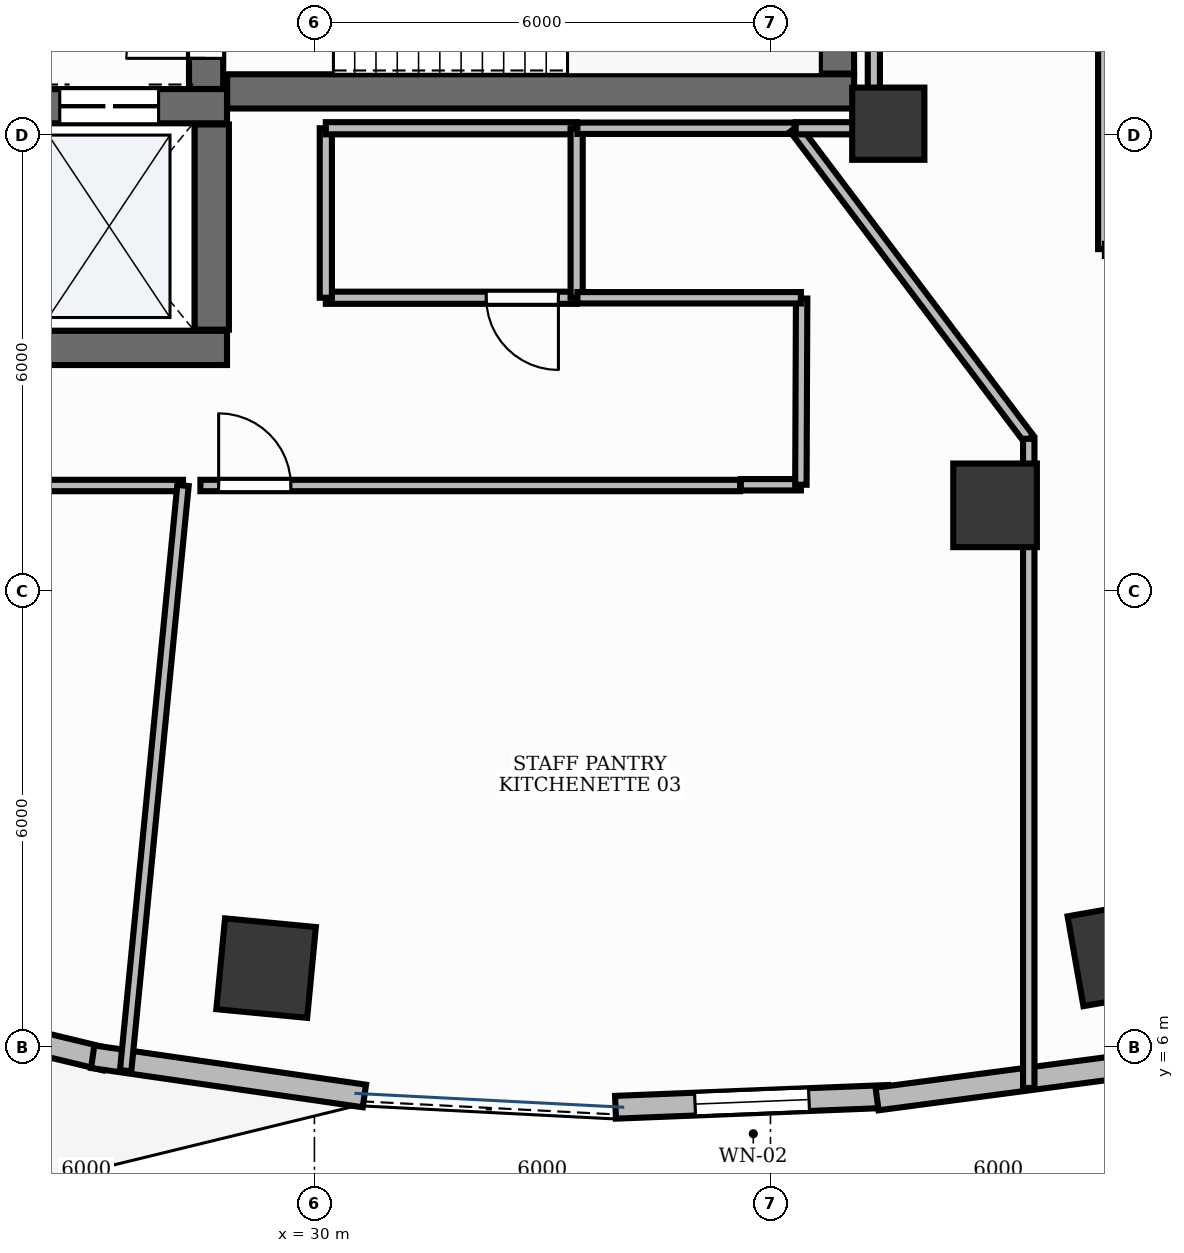
"""IFC4 building model, lengths in metres.
Left out: names, types, materials, properties, quantities, classifications, styles, units other than length and angle.
Written with IfcOpenShell. Run it as: python <this file> out.ifc"""

import sys

from ifc_helpers import new_model, si_unit, direction, frame, frame_2d, origin, origin_2d, place, context, subcontext, project, spatial, rectangle, extrude, element, fill, save


model = new_model("IFC4")
c1 = context("Model", 3, precision=1e-05, world=origin(), true_north=direction((0.0, 1.0)))
c2 = subcontext(c1, "Body", "Model", "MODEL_VIEW")
j1 = project(units=[si_unit("LENGTHUNIT", "METRE"), si_unit("PLANEANGLEUNIT", "RADIAN")], contexts=[c1])
p1 = place(None, origin())
s1 = spatial("IfcSite", under=j1, at=p1, CompositionType="ELEMENT")
p2 = place(p1, origin())
s2 = spatial("IfcBuilding", under=s1, at=p2, CompositionType="ELEMENT")
p3 = place(p2, frame((0.0, 0.0, 90.0)))
s3 = spatial("IfcBuildingStorey", under=s2, at=p3, CompositionType="ELEMENT", Elevation=90.0)
p4 = place(p3, frame((28.852, 18.575, 0.0), z_axis=(0.0, 0.0, 1.0), x_axis=(1.0, 0.0, 0.0)))
e1 = element("IfcWall", 1, at=p4, inside=s3, PredefinedType="SHEAR", context=c2, shape_type="SweptSolid", body=[
    extrude(rectangle(XDim=8.248, YDim=0.45, at=frame_2d((4.124, 0.0))), origin(), (0.0, 0.0, 1.0), 3.9),
])
p5 = place(p3, frame((36.875, 18.81, 0.0), z_axis=(0.0, 0.0, 1.0), x_axis=(0.0, 1.0, 0.0)))
e2 = element("IfcWall", 2, at=p5, inside=s3, PredefinedType="SHEAR", context=c2, shape_type="SweptSolid", body=[
    extrude(rectangle(XDim=3.08, YDim=0.45, at=frame_2d((1.54, 0.0))), origin(), (0.0, 0.0, 1.0), 3.9),
])
p6 = place(p3, frame((28.575, 18.607, 0.0), z_axis=(0.0, 0.0, 1.0), x_axis=(0.0, 1.0, 0.0)))
e3 = element("IfcWall", 3, at=p6, inside=s3, PredefinedType="SHEAR", context=c2, shape_type="SweptSolid", body=[
    extrude(rectangle(XDim=3.283, YDim=0.45, at=frame_2d((1.642, 0.0))), origin(), (0.0, 0.0, 1.0), 3.9),
])
p7 = place(p6, frame((0.403, 0.0, 0.0)))
e4 = element("IfcOpeningElement", 4, at=p7, cuts=e3, PredefinedType="OPENING", context=c2, shape_type="SweptSolid", body=[
    extrude(rectangle(XDim=1.05, YDim=2.15, at=frame_2d((0.525, 1.075))), frame((0.0, 0.24, 0.0), z_axis=(0.0, -1.0, 0.0), x_axis=(1.0, 0.0, 0.0)), (0.0, 0.0, 1.0), 0.48),
])
p8 = place(p3, frame((25.75, 15.2, 0.0), z_axis=(0.0, 0.0, 1.0), x_axis=(1.0, 0.0, 0.0)))
e5 = element("IfcWall", 5, at=p8, inside=s3, PredefinedType="SHEAR", context=c2, shape_type="SweptSolid", body=[
    extrude(rectangle(XDim=3.1, YDim=0.45, at=frame_2d((1.55, 0.0))), origin(), (0.0, 0.0, 1.0), 3.9),
])
p9 = place(p3, frame((25.75, 18.38, 0.0), z_axis=(0.0, 0.0, 1.0), x_axis=(1.0, 0.0, 0.0)))
e6 = element("IfcWall", 6, at=p9, inside=s3, PredefinedType="SHEAR", context=c2, shape_type="SweptSolid", body=[
    extrude(rectangle(XDim=3.1, YDim=0.45, at=frame_2d((1.55, 0.0))), origin(), (0.0, 0.0, 1.0), 3.9),
])
p10 = place(p9, frame((0.9, 0.0, 0.0)))
e7 = element("IfcOpeningElement", 7, at=p10, cuts=e6, PredefinedType="OPENING", context=c2, shape_type="SweptSolid", body=[
    extrude(rectangle(XDim=1.3, YDim=2.2, at=frame_2d((0.65, 1.1))), frame((0.0, 0.24, 0.0), z_axis=(0.0, -1.0, 0.0), x_axis=(1.0, 0.0, 0.0)), (0.0, 0.0, 1.0), 0.48),
])
p11 = place(p3, frame((28.65, 15.44, 0.0), z_axis=(0.0, 0.0, 1.0), x_axis=(0.0, 1.0, 0.0)))
e8 = element("IfcWall", 8, at=p11, inside=s3, PredefinedType="SHEAR", context=c2, shape_type="SweptSolid", body=[
    extrude(rectangle(XDim=2.7, YDim=0.45, at=frame_2d((1.35, 0.0))), origin(), (0.0, 0.0, 1.0), 3.9),
])
p12 = place(p3, frame((37.55, 18.15, -0.0), z_axis=(0.0, 0.0, 1.0), x_axis=(1.0, 0.0, 0.0)))
e9 = element("IfcColumn", 9, at=p12, inside=s3, PredefinedType="PILASTER", context=c2, shape_type="SweptSolid", body=[
    extrude(rectangle(XDim=0.95, YDim=0.95, at=origin_2d()), origin(), (0.0, 0.0, 1.0), 3.901),
])
for number, where, z_axis, x_axis in (
    (10, (29.364, 7.041, -0.0), (0.0, 0.0, 1.0), (-0.995, 0.095, 0.0)),
    (11, (40.604, 7.235, -0.0), (0.0, 0.0, 1.0), (0.985, 0.173, 0.0)),
):
    element("IfcColumn", number, at=place(p3, frame(where, z_axis=z_axis, x_axis=x_axis)), inside=s3, PredefinedType="COLUMN", context=c2, shape_type="SweptSolid", body=[
        extrude(rectangle(XDim=1.2, YDim=1.2, at=origin_2d()), origin(), (0.0, 0.0, 1.0), 3.901),
    ])
p13 = place(p3, frame((38.955, 13.129, -0.0), z_axis=(0.0, 0.0, 1.0), x_axis=(1.0, 0.0, 0.0)))
e12 = element("IfcColumn", 12, at=p13, inside=s3, PredefinedType="COLUMN", context=c2, shape_type="SweptSolid", body=[
    extrude(rectangle(XDim=1.1, YDim=1.1, at=origin_2d()), origin(), (0.0, 0.0, 1.0), 3.901),
])
p14 = place(p3, frame((33.961, 5.21, 0.0), z_axis=(0.0, 0.0, 1.0), x_axis=(0.999210691503, 0.039723972445, 0.0)))
e13 = element("IfcWall", 13, at=p14, inside=s3, PredefinedType="STANDARD", context=c2, shape_type="SweptSolid", body=[
    extrude(rectangle(XDim=3.595, YDim=0.3, at=frame_2d((1.798, 0.0))), origin(), (0.0, 0.0, 1.0), 3.9),
])
p15 = place(p14, frame((1.048, 0.0, 0.95)))
e14 = element("IfcOpeningElement", 14, at=p15, cuts=e13, PredefinedType="OPENING", context=c2, shape_type="SweptSolid", body=[
    extrude(rectangle(XDim=1.5, YDim=1.8, at=frame_2d((0.75, 0.9))), frame((0.0, 0.165, 0.0), z_axis=(0.0, -1.0, 0.0), x_axis=(1.0, 0.0, 0.0)), (0.0, 0.0, 1.0), 0.33),
])
p16 = place(p3, frame((23.784, 6.68, 0.0), z_axis=(0.0, 0.0, 1.0), x_axis=(0.972043452321, -0.234801036625, 0.0)))
e15 = element("IfcWall", 15, at=p16, inside=s3, PredefinedType="STANDARD", context=c2, shape_type="SweptSolid", body=[
    extrude(rectangle(XDim=3.569, YDim=0.3, at=frame_2d((1.784, 0.0))), origin(), (0.0, 0.0, 1.0), 3.9),
])
p17 = place(p3, frame((27.083, 5.875, 0.0), z_axis=(0.0, 0.0, 1.0), x_axis=(0.989734732902, -0.142916613754, 0.0)))
e16 = element("IfcWall", 16, at=p17, inside=s3, PredefinedType="STANDARD", context=c2, shape_type="SweptSolid", body=[
    extrude(rectangle(XDim=3.611, YDim=0.3, at=frame_2d((1.806, 0.0))), origin(), (0.0, 0.0, 1.0), 3.47),
])
p18 = place(p3, frame((37.402, 5.319, 0.0), z_axis=(0.0, 0.0, 1.0), x_axis=(0.991372969521, 0.131071107816, 0.0)))
e17 = element("IfcWall", 17, at=p18, inside=s3, PredefinedType="STANDARD", context=c2, shape_type="SweptSolid", body=[
    extrude(rectangle(XDim=3.615, YDim=0.3, at=frame_2d((1.808, 0.0))), origin(), (0.0, 0.0, 1.0), 3.9),
])
p19 = place(p3, frame((33.45, 15.86, 0.0), z_axis=(0.0, 0.0, 1.0), x_axis=(-1.0, 0.0, 0.0)))
e18 = element("IfcWall", 18, at=p19, inside=s3, PredefinedType="PARTITIONING", context=c2, shape_type="SweptSolid", body=[
    extrude(rectangle(XDim=3.3, YDim=0.16, at=frame_2d((1.65, 0.0))), origin(), (0.0, 0.0, 1.0), 2.91),
])
p20 = place(p19, frame((0.24, 0.0, 0.0)))
e19 = element("IfcOpeningElement", 19, at=p20, cuts=e18, PredefinedType="OPENING", context=c2, shape_type="SweptSolid", body=[
    extrude(rectangle(XDim=0.95, YDim=2.15, at=frame_2d((0.475, 1.075))), frame((0.0, 0.095, 0.0), z_axis=(0.0, -1.0, 0.0), x_axis=(1.0, 0.0, 0.0)), (0.0, 0.0, 1.0), 0.19),
])
p21 = place(p3, frame((21.8, 13.39, 0.0), z_axis=(0.0, 0.0, 1.0), x_axis=(1.0, 0.0, 0.0)))
e20 = element("IfcWall", 20, at=p21, inside=s3, PredefinedType="PARTITIONING", context=c2, shape_type="SweptSolid", body=[
    extrude(rectangle(XDim=6.471, YDim=0.15, at=frame_2d((3.236, 0.0))), origin(), (0.0, 0.0, 1.0), 2.91),
])
p22 = place(p21, frame((0.859, 0.0, 0.0)))
e21 = element("IfcOpeningElement", 21, at=p22, cuts=e20, PredefinedType="OPENING", context=c2, shape_type="SweptSolid", body=[
    extrude(rectangle(XDim=0.95, YDim=2.15, at=frame_2d((0.475, 1.075))), frame((0.0, 0.09, 0.0), z_axis=(0.0, -1.0, 0.0), x_axis=(1.0, 0.0, 0.0)), (0.0, 0.0, 1.0), 0.18),
])
p23 = place(p3, frame((28.5, 13.39, 0.0), z_axis=(0.0, 0.0, 1.0), x_axis=(1.0, 0.0, 0.0)))
e22 = element("IfcWall", 22, at=p23, inside=s3, PredefinedType="PARTITIONING", context=c2, shape_type="SweptSolid", body=[
    extrude(rectangle(XDim=7.1, YDim=0.15, at=frame_2d((3.55, 0.0))), origin(), (0.0, 0.0, 1.0), 2.91),
])
p24 = place(p23, frame((0.24, 0.0, 0.0)))
e23 = element("IfcOpeningElement", 23, at=p24, cuts=e22, PredefinedType="OPENING", context=c2, shape_type="SweptSolid", body=[
    extrude(rectangle(XDim=0.95, YDim=2.15, at=frame_2d((0.475, 1.075))), frame((0.0, 0.09, 0.0), z_axis=(0.0, -1.0, 0.0), x_axis=(1.0, 0.0, 0.0)), (0.0, 0.0, 1.0), 0.18),
])
p25 = place(p3, frame((30.15, 15.86, 0.0), z_axis=(0.0, 0.0, 1.0), x_axis=(0.0, 1.0, 0.0)))
e24 = element("IfcWall", 24, at=p25, inside=s3, PredefinedType="PARTITIONING", context=c2, shape_type="SweptSolid", body=[
    extrude(rectangle(XDim=2.23, YDim=0.16, at=frame_2d((1.115, 0.0))), origin(), (0.0, 0.0, 1.0), 2.91),
])
p26 = place(p3, frame((30.15, 18.09, 0.0), z_axis=(0.0, 0.0, 1.0), x_axis=(1.0, 0.0, 0.0)))
e25 = element("IfcWall", 25, at=p26, inside=s3, PredefinedType="PARTITIONING", context=c2, shape_type="SweptSolid", body=[
    extrude(rectangle(XDim=3.3, YDim=0.16, at=frame_2d((1.65, 0.0))), origin(), (0.0, 0.0, 1.0), 2.91),
])
p27 = place(p3, frame((33.45, 18.09, 0.0), z_axis=(0.0, 0.0, 1.0), x_axis=(0.0, -1.0, 0.0)))
e26 = element("IfcWall", 26, at=p27, inside=s3, PredefinedType="PARTITIONING", context=c2, shape_type="SweptSolid", body=[
    extrude(rectangle(XDim=2.23, YDim=0.16, at=frame_2d((1.115, 0.0))), origin(), (0.0, 0.0, 1.0), 2.91),
])
p28 = place(p3, frame((28.271, 13.39, 0.0), z_axis=(0.0, 0.0, 1.0), x_axis=(-0.097584908723, -0.995227202999, 0.0)))
e27 = element("IfcWall", 27, at=p28, inside=s3, PredefinedType="PARTITIONING", context=c2, shape_type="SweptSolid", body=[
    extrude(rectangle(XDim=7.736, YDim=0.15, at=frame_2d((3.868, 0.0))), origin(), (0.0, 0.0, 1.0), 2.91),
])
p29 = place(p3, frame((35.61, 13.4, 0.0), z_axis=(0.0, 0.0, 1.0), x_axis=(1.0, 0.0, 0.0)))
e28 = element("IfcWall", 28, at=p29, inside=s3, PredefinedType="PARTITIONING", context=c2, shape_type="SweptSolid", body=[
    extrude(rectangle(XDim=0.79, YDim=0.15, at=frame_2d((0.395, 0.0))), origin(), (0.0, 0.0, 1.0), 2.91),
])
p30 = place(p3, frame((36.4, 13.4, 0.0), z_axis=(0.0, 0.0, 1.0), x_axis=(0.004085258855, 0.999991655295, 0.0)))
e29 = element("IfcWall", 29, at=p30, inside=s3, PredefinedType="PARTITIONING", context=c2, shape_type="SweptSolid", body=[
    extrude(rectangle(XDim=2.45, YDim=0.15, at=frame_2d((1.225, 0.0))), origin(), (0.0, 0.0, 1.0), 2.91),
])
p31 = place(p3, frame((36.4, 15.86, 0.0), z_axis=(0.0, 0.0, 1.0), x_axis=(-1.0, 0.0, 0.0)))
e30 = element("IfcWall", 30, at=p31, inside=s3, PredefinedType="PARTITIONING", context=c2, shape_type="SweptSolid", body=[
    extrude(rectangle(XDim=2.94, YDim=0.15, at=frame_2d((1.47, 0.0))), origin(), (0.0, 0.0, 1.0), 2.91),
])
p32 = place(p3, frame((33.46, 18.09, 0.0), z_axis=(0.0, 0.0, 1.0), x_axis=(1.0, 0.0, 0.0)))
e31 = element("IfcWall", 31, at=p32, inside=s3, PredefinedType="PARTITIONING", context=c2, shape_type="SweptSolid", body=[
    extrude(rectangle(XDim=2.859, YDim=0.15, at=frame_2d((1.43, 0.0))), origin(), (0.0, 0.0, 1.0), 2.91),
])
p33 = place(p3, frame((36.319, 18.09, 0.0), z_axis=(0.0, 0.0, 1.0), x_axis=(0.601792892962, -0.798652185861, 0.0)))
e32 = element("IfcWall", 32, at=p33, inside=s3, PredefinedType="PARTITIONING", context=c2, shape_type="SweptSolid", body=[
    extrude(rectangle(XDim=5.116, YDim=0.15, at=frame_2d((2.558, 0.0))), origin(), (0.0, 0.0, 1.0), 2.91),
])
p34 = place(p3, frame((39.398, 14.004, 0.0), z_axis=(0.0, 0.0, 1.0), x_axis=(0.0, -1.0, 0.0)))
e33 = element("IfcWall", 33, at=p34, inside=s3, PredefinedType="PARTITIONING", context=c2, shape_type="SweptSolid", body=[
    extrude(rectangle(XDim=8.54, YDim=0.15, at=frame_2d((4.27, 0.0))), origin(), (0.0, 0.0, 1.0), 2.91),
])
p35 = place(p3, frame((40.39, 20.416, 0.0), z_axis=(0.0, 0.0, 1.0), x_axis=(0.0, -1.0, 0.0)))
e34 = element("IfcWall", 34, at=p35, inside=s3, PredefinedType="PARTITIONING", context=c2, shape_type="SweptSolid", body=[
    extrude(rectangle(XDim=3.916, YDim=0.16, at=frame_2d((1.958, 0.0))), origin(), (0.0, 0.0, 1.0), 2.91),
])
p36 = place(p3, frame((36.332, 18.09, 0.0), z_axis=(0.0, 0.0, 1.0), x_axis=(1.0, 0.0, 0.0)))
e35 = element("IfcWall", 35, at=p36, inside=s3, PredefinedType="PARTITIONING", context=c2, shape_type="SweptSolid", body=[
    extrude(rectangle(XDim=1.018, YDim=0.16, at=frame_2d((0.509, 0.0))), origin(), (0.0, 0.0, 1.0), 2.91),
])
p37 = place(p3, frame((37.36, 18.1, 0.0), z_axis=(0.0, 0.0, 1.0), x_axis=(0.0, 1.0, 0.0)))
e36 = element("IfcWall", 36, at=p37, inside=s3, PredefinedType="PARTITIONING", context=c2, shape_type="SweptSolid", body=[
    extrude(rectangle(XDim=4.166, YDim=0.16, at=frame_2d((2.083, 0.0))), origin(), (0.0, 0.0, 1.0), 2.91),
])
p38 = place(p15, origin())
e37 = element("IfcWindow", 37, at=p38, inside=s3, PartitioningType="DOUBLE_PANEL_VERTICAL", PredefinedType="WINDOW", context=c2, shape_type="SweptSolid", body=[
    extrude(rectangle(XDim=1.5, YDim=1.8, at=frame_2d((0.75, 0.9))), frame((0.0, 0.03, 0.0), z_axis=(0.0, -1.0, 0.0), x_axis=(1.0, 0.0, 0.0)), (0.0, 0.0, 1.0), 0.06),
])
fill(e14, e37)
p39 = place(p7, origin())
e38 = element("IfcDoor", 38, at=p39, inside=s3, OperationType="SINGLE_SWING_LEFT", PredefinedType="DOOR", context=c2, shape_type="SweptSolid", body=[
    extrude(rectangle(XDim=1.05, YDim=2.15, at=frame_2d((0.525, 1.075))), frame((0.0, 0.025, 0.0), z_axis=(0.0, -1.0, 0.0), x_axis=(1.0, 0.0, 0.0)), (0.0, 0.0, 1.0), 0.05),
])
fill(e4, e38)
p40 = place(p10, origin())
e39 = element("IfcDoor", 39, at=p40, inside=s3, OperationType="DOUBLE_DOOR_SLIDING", PredefinedType="DOOR", context=c2, shape_type="SweptSolid", body=[
    extrude(rectangle(XDim=1.3, YDim=2.2, at=frame_2d((0.65, 1.1))), frame((0.0, 0.025, 0.0), z_axis=(0.0, -1.0, 0.0), x_axis=(1.0, 0.0, 0.0)), (0.0, 0.0, 1.0), 0.05),
])
fill(e7, e39)
p41 = place(p20, origin())
e40 = element("IfcDoor", 40, at=p41, inside=s3, OperationType="SINGLE_SWING_LEFT", PredefinedType="DOOR", context=c2, shape_type="SweptSolid", body=[
    extrude(rectangle(XDim=0.95, YDim=2.15, at=frame_2d((0.475, 1.075))), frame((0.0, 0.025, 0.0), z_axis=(0.0, -1.0, 0.0), x_axis=(1.0, 0.0, 0.0)), (0.0, 0.0, 1.0), 0.05),
])
fill(e19, e40)
p42 = place(p24, origin())
e41 = element("IfcDoor", 41, at=p42, inside=s3, OperationType="SINGLE_SWING_LEFT", PredefinedType="DOOR", context=c2, shape_type="SweptSolid", body=[
    extrude(rectangle(XDim=0.95, YDim=2.15, at=frame_2d((0.475, 1.075))), frame((0.0, 0.025, 0.0), z_axis=(0.0, -1.0, 0.0), x_axis=(1.0, 0.0, 0.0)), (0.0, 0.0, 1.0), 0.05),
])
fill(e23, e41)
save(model, sys.argv[1])
